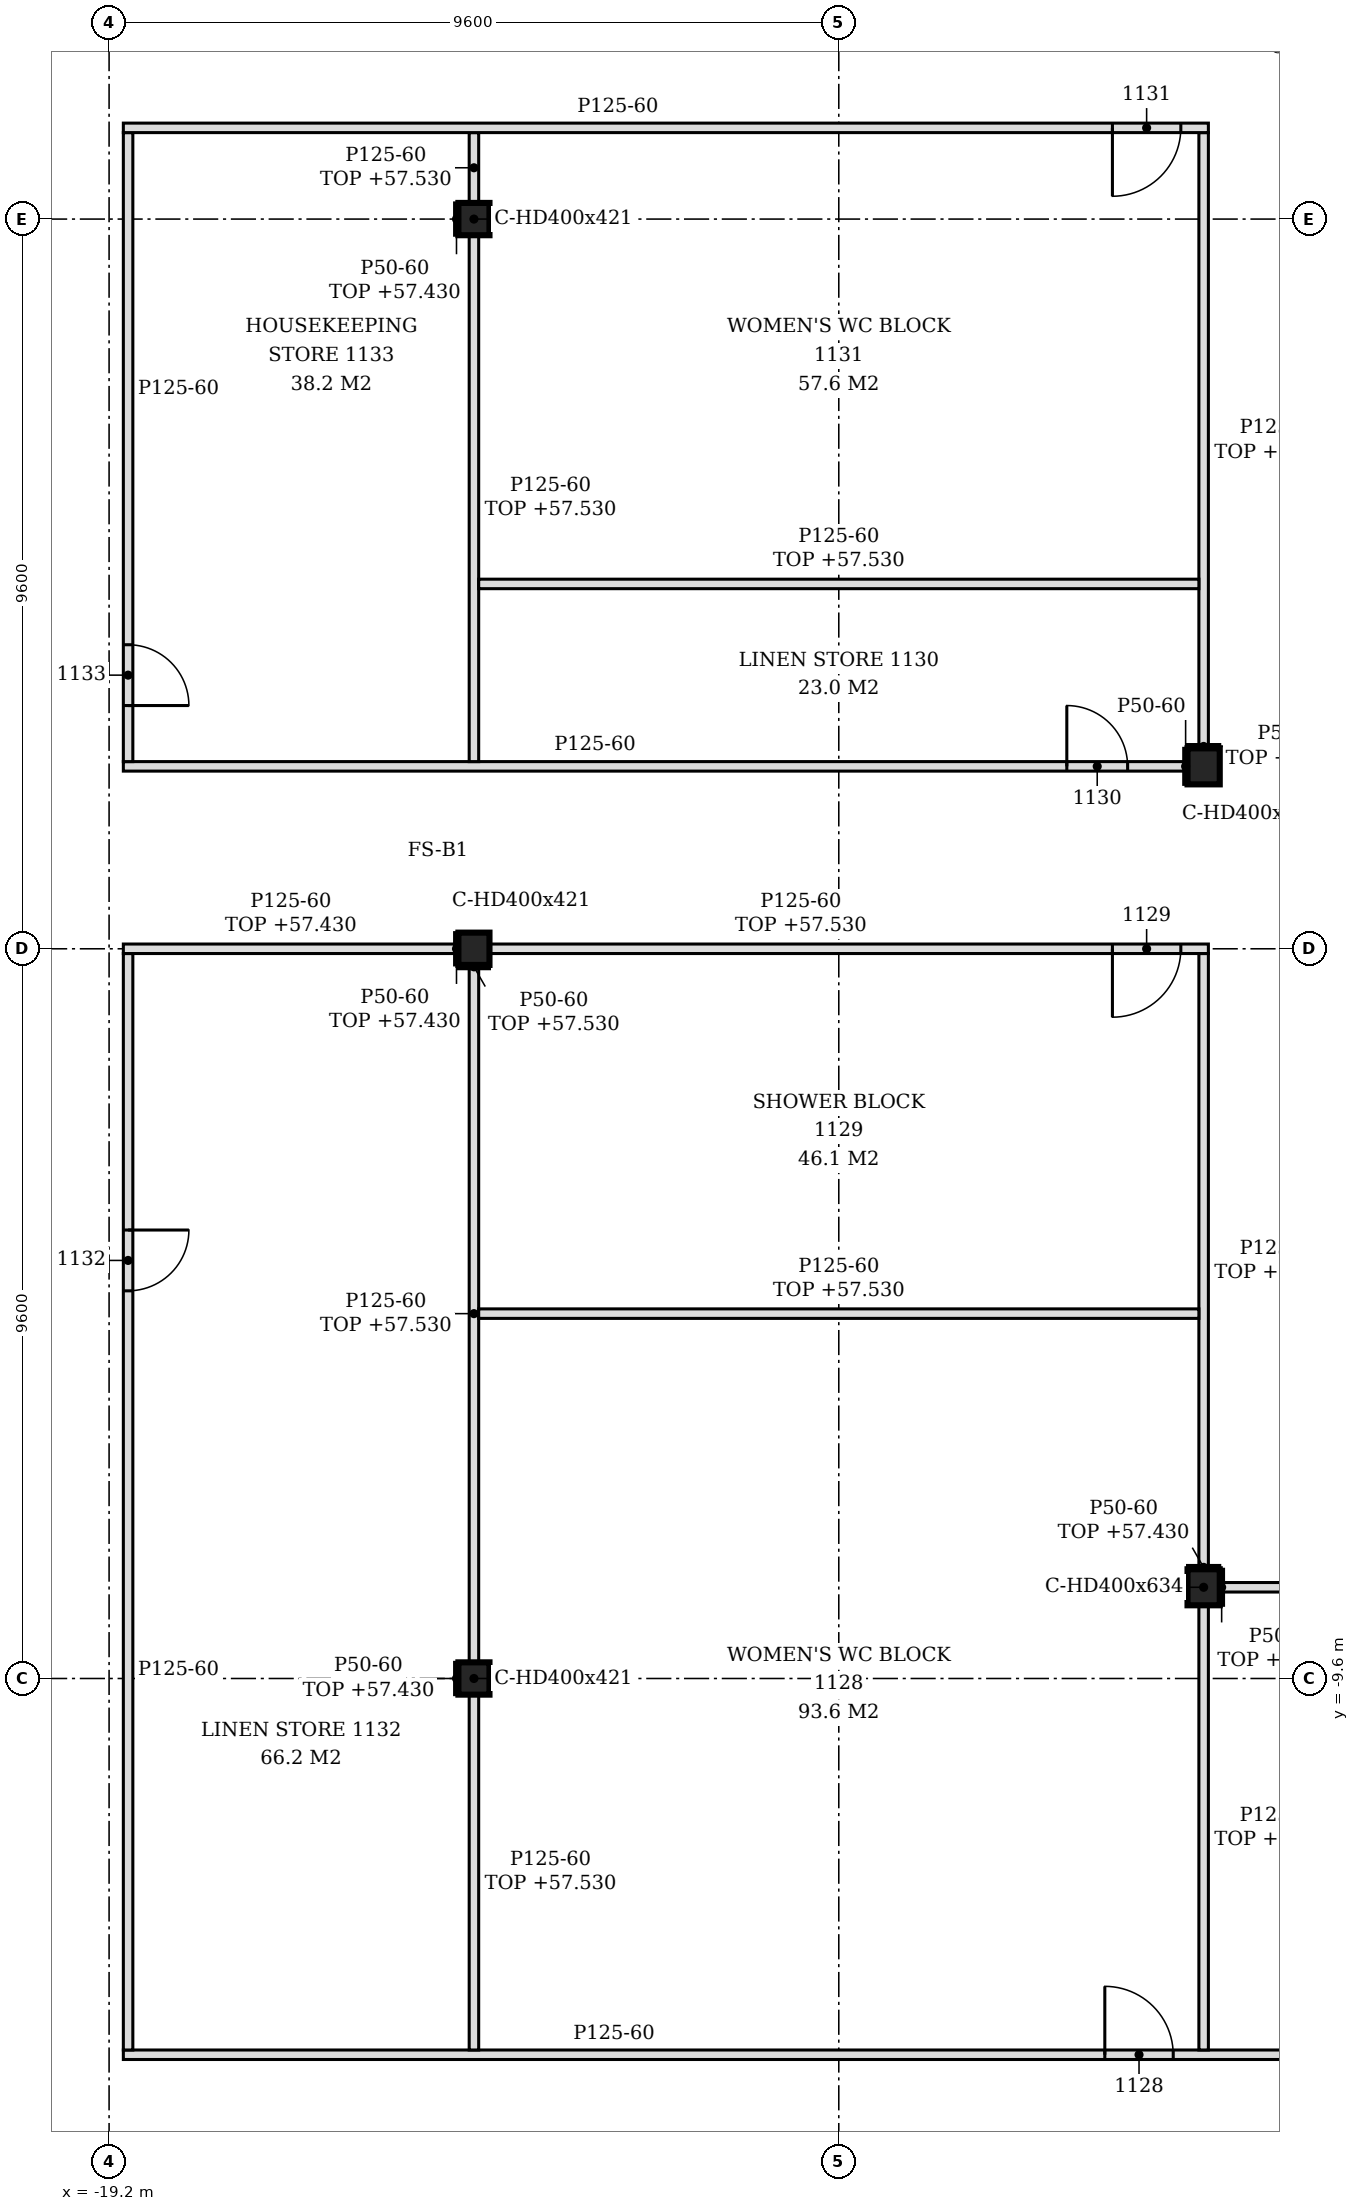
"""IFC4 building model, lengths in metres.
Left out: names, types, materials, properties, quantities, classifications, styles, units other than length and angle.
Written with IfcOpenShell. Run it as: python <this file> out.ifc"""

import sys

from ifc_helpers import new_model, si_unit, direction, frame, frame_2d, origin, origin_2d, place, context, subcontext, project, spatial, polyline, rectangle, i_section, outline, extrude, element, fill, save


model = new_model("IFC4")
c1 = context("Model", 3, precision=1e-05, world=origin(), true_north=direction((0.0, 1.0)))
c2 = subcontext(c1, "Body", "Model", "MODEL_VIEW")
j1 = project(units=[si_unit("LENGTHUNIT", "METRE"), si_unit("PLANEANGLEUNIT", "RADIAN")], contexts=[c1])
p1 = place(None, origin())
s1 = spatial("IfcSite", under=j1, at=p1, CompositionType="ELEMENT")
p2 = place(p1, origin())
s2 = spatial("IfcBuilding", under=s1, at=p2, CompositionType="ELEMENT")
p3 = place(p2, frame((0.0, 0.0, 54.6)))
s3 = spatial("IfcBuildingStorey", under=s2, at=p3, CompositionType="ELEMENT", Elevation=54.6)
for number, where, z_axis, x_axis in (
    (1, (-4.8, -8.4, -0.15), (0.0, 0.0, 1.0), (1.0, 0.0, 0.0)),
    (2, (-4.8, 2.4, -0.15), (0.0, 0.0, 1.0), (1.0, 0.0, 0.0)),
):
    element("IfcColumn", number, at=place(p3, frame(where, z_axis=z_axis, x_axis=x_axis)), inside=s3, PredefinedType="COLUMN", context=c2, shape_type="SweptSolid", body=[
        extrude(i_section(OverallWidth=0.424, OverallDepth=0.474, WebThickness=0.048, FlangeThickness=0.077, FilletRadius=0.015, at=origin_2d()), origin(), (0.0, 0.0, 1.0), 3.6),
    ])
for number, where, z_axis, x_axis in (
    (3, (-14.4, -9.6, -0.15), (0.0, 0.0, 1.0), (1.0, 0.0, 0.0)),
    (4, (-14.4, 0.0, -0.15), (0.0, 0.0, 1.0), (1.0, 0.0, 0.0)),
    (5, (-14.4, 9.6, -0.15), (0.0, 0.0, 1.0), (1.0, 0.0, 0.0)),
):
    element("IfcColumn", number, at=place(p3, frame(where, z_axis=z_axis, x_axis=x_axis)), inside=s3, PredefinedType="COLUMN", context=c2, shape_type="SweptSolid", body=[
        extrude(i_section(OverallWidth=0.409, OverallDepth=0.425, WebThickness=0.033, FlangeThickness=0.052, FilletRadius=0.015, at=origin_2d()), origin(), (0.0, 0.0, 1.0), 3.6),
    ])
p4 = place(p3, frame((-19.012, -14.55, 0.0), z_axis=(0.0, 0.0, 1.0), x_axis=(1.0, 0.0, 0.0)))
e6 = element("IfcWall", 6, at=p4, inside=s3, PredefinedType="PARTITIONING", context=c2, shape_type="SweptSolid", body=[
    extrude(outline(polyline([(0.0, 0.0), (19.075, 0.0), (19.075, 3.45), (14.363, 3.45), (14.361, 2.73), (14.062, 2.73), (14.061, 3.45), (4.762, 3.45), (4.76, 2.93), (4.462, 2.93), (4.46, 2.83), (0.0, 2.83), (0.0, 0.0)])), frame((0.0, 0.062, 0.0), z_axis=(0.0, -1.0, 0.0), x_axis=(1.0, 0.0, 0.0)), (0.0, 0.0, 1.0), 0.125),
])
p5 = place(p4, frame((12.913, 0.0, 0.0)))
e7 = element("IfcOpeningElement", 7, at=p5, cuts=e6, PredefinedType="OPENING", context=c2, shape_type="SweptSolid", body=[
    extrude(rectangle(XDim=0.9, YDim=2.1, at=frame_2d((0.45, 1.05))), frame((0.0, 0.073, 0.0), z_axis=(0.0, -1.0, 0.0), x_axis=(1.0, 0.0, 0.0)), (0.0, 0.0, 1.0), 0.145),
])
p6 = place(p3, frame((-18.95, -14.488, 0.0), z_axis=(0.0, 0.0, 1.0), x_axis=(0.0, 1.0, 0.0)))
e8 = element("IfcWall", 8, at=p6, inside=s3, PredefinedType="PARTITIONING", context=c2, shape_type="SweptSolid", body=[
    extrude(outline(polyline([(0.0, 0.0), (14.425, 0.0), (14.425, 2.83), (14.377, 2.83), (14.375, 3.45), (9.798, 3.45), (9.795, 2.83), (9.577, 2.83), (9.575, 3.45), (4.998, 3.45), (4.996, 2.83), (4.778, 2.83), (4.775, 3.45), (0.198, 3.45), (0.196, 2.83), (0.0, 2.83), (0.0, 0.0)])), frame((0.0, 0.062, 0.0), z_axis=(0.0, -1.0, 0.0), x_axis=(1.0, 0.0, 0.0)), (0.0, 0.0, 1.0), 0.125),
])
p7 = place(p6, frame((9.988, 0.0, 0.0)))
e9 = element("IfcOpeningElement", 9, at=p7, cuts=e8, PredefinedType="OPENING", context=c2, shape_type="SweptSolid", body=[
    extrude(rectangle(XDim=0.8, YDim=2.1, at=frame_2d((0.4, 1.05))), frame((0.0, 0.073, 0.0), z_axis=(0.0, -1.0, 0.0), x_axis=(1.0, 0.0, 0.0)), (0.0, 0.0, 1.0), 0.145),
])
p8 = place(p3, frame((-14.4, -14.488, 0.0), z_axis=(0.0, 0.0, 1.0), x_axis=(0.0, 1.0, 0.0)))
e10 = element("IfcWall", 10, at=p8, inside=s3, PredefinedType="PARTITIONING", context=c2, shape_type="SweptSolid", body=[
    extrude(rectangle(XDim=4.675, YDim=0.125, at=frame_2d((2.337, 0.0))), origin(), (0.0, 0.0, 1.0), 2.93),
])
p9 = place(p3, frame((-4.8, -14.488, 0.0), z_axis=(0.0, 0.0, 1.0), x_axis=(0.0, 1.0, 0.0)))
e11 = element("IfcWall", 11, at=p9, inside=s3, PredefinedType="PARTITIONING", context=c2, shape_type="SweptSolid", body=[
    extrude(rectangle(XDim=5.851, YDim=0.125, at=frame_2d((2.925, 0.0))), origin(), (0.0, 0.0, 1.0), 2.73),
])
p10 = place(p3, frame((-14.4, -9.387, 0.0), z_axis=(0.0, 0.0, 1.0), x_axis=(0.0, 1.0, 0.0)))
e12 = element("IfcWall", 12, at=p10, inside=s3, PredefinedType="PARTITIONING", context=c2, shape_type="SweptSolid", body=[
    extrude(rectangle(XDim=9.175, YDim=0.125, at=frame_2d((4.587, 0.0))), origin(), (0.0, 0.0, 1.0), 2.93),
])
p11 = place(p3, frame((-4.588, -8.4, 0.0), z_axis=(0.0, 0.0, 1.0), x_axis=(1.0, 0.0, 0.0)))
e13 = element("IfcWall", 13, at=p11, inside=s3, PredefinedType="PARTITIONING", context=c2, shape_type="SweptSolid", body=[
    extrude(rectangle(XDim=4.65, YDim=0.125, at=frame_2d((2.325, 0.0))), origin(), (0.0, 0.0, 1.0), 2.83),
])
p12 = place(p3, frame((-4.8, -8.163, 0.0), z_axis=(0.0, 0.0, 1.0), x_axis=(0.0, 1.0, 0.0)))
e14 = element("IfcWall", 14, at=p12, inside=s3, PredefinedType="PARTITIONING", context=c2, shape_type="SweptSolid", body=[
    extrude(rectangle(XDim=8.101, YDim=0.125, at=frame_2d((4.05, 0.0))), origin(), (0.0, 0.0, 1.0), 2.83),
])
p13 = place(p3, frame((-14.337, -4.8, 0.0), z_axis=(0.0, 0.0, 1.0), x_axis=(1.0, 0.0, 0.0)))
e15 = element("IfcWall", 15, at=p13, inside=s3, PredefinedType="PARTITIONING", context=c2, shape_type="SweptSolid", body=[
    extrude(outline(polyline([(0.0, 0.0), (9.475, 0.0), (9.475, 2.83), (9.387, 2.83), (9.385, 2.93), (0.0, 2.93), (0.0, 0.0)])), frame((0.0, 0.062, 0.0), z_axis=(0.0, -1.0, 0.0), x_axis=(1.0, 0.0, 0.0)), (0.0, 0.0, 1.0), 0.125),
])
p14 = place(p3, frame((-19.012, 0.0, 0.0), z_axis=(0.0, 0.0, 1.0), x_axis=(1.0, 0.0, 0.0)))
e16 = element("IfcWall", 16, at=p14, inside=s3, PredefinedType="PARTITIONING", context=c2, shape_type="SweptSolid", body=[
    extrude(rectangle(XDim=4.408, YDim=0.125, at=frame_2d((2.204, 0.0))), origin(), (0.0, 0.0, 1.0), 2.83),
])
p15 = place(p3, frame((-14.196, 0.0, 0.0), z_axis=(0.0, 0.0, 1.0), x_axis=(1.0, 0.0, 0.0)))
e17 = element("IfcWall", 17, at=p15, inside=s3, PredefinedType="PARTITIONING", context=c2, shape_type="SweptSolid", body=[
    extrude(outline(polyline([(0.0, 0.0), (9.458, 0.0), (9.458, 2.83), (9.246, 2.83), (9.243, 2.93), (0.0, 2.93), (0.0, 0.0)])), frame((0.0, 0.062, 0.0), z_axis=(0.0, -1.0, 0.0), x_axis=(1.0, 0.0, 0.0)), (0.0, 0.0, 1.0), 0.125),
])
p16 = place(p15, frame((8.196, 0.0, 0.0)))
e18 = element("IfcOpeningElement", 18, at=p16, cuts=e17, PredefinedType="OPENING", context=c2, shape_type="SweptSolid", body=[
    extrude(rectangle(XDim=0.9, YDim=2.1, at=frame_2d((0.45, 1.05))), frame((0.0, 0.073, 0.0), z_axis=(0.0, -1.0, 0.0), x_axis=(1.0, 0.0, 0.0)), (0.0, 0.0, 1.0), 0.145),
])
p17 = place(p3, frame((-19.012, 2.4, 0.0), z_axis=(0.0, 0.0, 1.0), x_axis=(1.0, 0.0, 0.0)))
e19 = element("IfcWall", 19, at=p17, inside=s3, PredefinedType="PARTITIONING", context=c2, shape_type="SweptSolid", body=[
    extrude(outline(polyline([(0.0, 0.0), (14.0, 0.0), (14.0, 3.45), (4.762, 3.45), (4.76, 2.93), (4.462, 2.93), (4.46, 3.45), (0.0, 3.45), (0.0, 0.0)])), frame((0.0, 0.062, 0.0), z_axis=(0.0, -1.0, 0.0), x_axis=(1.0, 0.0, 0.0)), (0.0, 0.0, 1.0), 0.125),
])
p18 = place(p17, frame((12.413, 0.0, 0.0)))
e20 = element("IfcOpeningElement", 20, at=p18, cuts=e19, PredefinedType="OPENING", context=c2, shape_type="SweptSolid", body=[
    extrude(rectangle(XDim=0.8, YDim=2.1, at=frame_2d((0.4, 1.05))), frame((0.0, 0.073, 0.0), z_axis=(0.0, -1.0, 0.0), x_axis=(1.0, 0.0, 0.0)), (0.0, 0.0, 1.0), 0.145),
])
p19 = place(p3, frame((-18.95, 2.462, 0.0), z_axis=(0.0, 0.0, 1.0), x_axis=(0.0, 1.0, 0.0)))
e21 = element("IfcWall", 21, at=p19, inside=s3, PredefinedType="PARTITIONING", context=c2, shape_type="SweptSolid", body=[
    extrude(outline(polyline([(0.0, 0.0), (8.275, 0.0), (8.275, 3.45), (7.248, 3.45), (7.246, 2.83), (7.028, 2.83), (7.025, 3.45), (2.448, 3.45), (2.446, 2.83), (2.228, 2.83), (2.226, 3.45), (0.0, 3.45), (0.0, 0.0)])), frame((0.0, 0.062, 0.0), z_axis=(0.0, -1.0, 0.0), x_axis=(1.0, 0.0, 0.0)), (0.0, 0.0, 1.0), 0.125),
])
p20 = place(p19, frame((0.738, 0.0, 0.0)))
e22 = element("IfcOpeningElement", 22, at=p20, cuts=e21, PredefinedType="OPENING", context=c2, shape_type="SweptSolid", body=[
    extrude(rectangle(XDim=0.8, YDim=2.1, at=frame_2d((0.4, 1.05))), frame((0.0, 0.073, 0.0), z_axis=(0.0, -1.0, 0.0), x_axis=(1.0, 0.0, 0.0)), (0.0, 0.0, 1.0), 0.145),
])
p21 = place(p3, frame((-14.4, 2.462, 0.0), z_axis=(0.0, 0.0, 1.0), x_axis=(0.0, 1.0, 0.0)))
e23 = element("IfcWall", 23, at=p21, inside=s3, PredefinedType="PARTITIONING", context=c2, shape_type="SweptSolid", body=[
    extrude(rectangle(XDim=6.925, YDim=0.125, at=frame_2d((3.462, 0.0))), origin(), (0.0, 0.0, 1.0), 2.93),
])
p22 = place(p3, frame((-4.8, 2.637, 0.0), z_axis=(0.0, 0.0, 1.0), x_axis=(0.0, 1.0, 0.0)))
e24 = element("IfcWall", 24, at=p22, inside=s3, PredefinedType="PARTITIONING", context=c2, shape_type="SweptSolid", body=[
    extrude(rectangle(XDim=8.101, YDim=0.125, at=frame_2d((4.05, 0.0))), origin(), (0.0, 0.0, 1.0), 2.83),
])
p23 = place(p3, frame((-14.337, 4.8, 0.0), z_axis=(0.0, 0.0, 1.0), x_axis=(1.0, 0.0, 0.0)))
e25 = element("IfcWall", 25, at=p23, inside=s3, PredefinedType="PARTITIONING", context=c2, shape_type="SweptSolid", body=[
    extrude(outline(polyline([(0.0, 0.0), (9.475, 0.0), (9.475, 2.83), (9.387, 2.83), (9.385, 2.93), (0.0, 2.93), (0.0, 0.0)])), frame((0.0, 0.062, 0.0), z_axis=(0.0, -1.0, 0.0), x_axis=(1.0, 0.0, 0.0)), (0.0, 0.0, 1.0), 0.125),
])
p24 = place(p3, frame((-14.4, 9.812, 0.0), z_axis=(0.0, 0.0, 1.0), x_axis=(0.0, 1.0, 0.0)))
e26 = element("IfcWall", 26, at=p24, inside=s3, PredefinedType="PARTITIONING", context=c2, shape_type="SweptSolid", body=[
    extrude(rectangle(XDim=0.925, YDim=0.125, at=frame_2d((0.462, 0.0))), origin(), (0.0, 0.0, 1.0), 2.93),
])
p25 = place(p3, frame((-19.012, 10.8, 0.0), z_axis=(0.0, 0.0, 1.0), x_axis=(1.0, 0.0, 0.0)))
e27 = element("IfcWall", 27, at=p25, inside=s3, PredefinedType="PARTITIONING", context=c2, shape_type="SweptSolid", body=[
    extrude(outline(polyline([(0.0, 0.0), (14.275, 0.0), (14.275, 2.83), (14.062, 2.83), (14.061, 3.45), (4.762, 3.45), (4.76, 2.93), (4.462, 2.93), (4.46, 3.45), (0.0, 3.45), (0.0, 0.0)])), frame((0.0, 0.062, 0.0), z_axis=(0.0, -1.0, 0.0), x_axis=(1.0, 0.0, 0.0)), (0.0, 0.0, 1.0), 0.125),
])
p26 = place(p25, frame((13.012, 0.0, 0.0)))
e28 = element("IfcOpeningElement", 28, at=p26, cuts=e27, PredefinedType="OPENING", context=c2, shape_type="SweptSolid", body=[
    extrude(rectangle(XDim=0.9, YDim=2.1, at=frame_2d((0.45, 1.05))), frame((0.0, 0.073, 0.0), z_axis=(0.0, -1.0, 0.0), x_axis=(1.0, 0.0, 0.0)), (0.0, 0.0, 1.0), 0.145),
])
p27 = place(p3, frame((-14.629, -9.812, 0.0), z_axis=(0.0, 0.0, 1.0), x_axis=(0.0, 1.0, 0.0)))
e29 = element("IfcWall", 29, at=p27, inside=s3, PredefinedType="PARTITIONING", context=c2, shape_type="SweptSolid", body=[
    extrude(rectangle(XDim=0.425, YDim=0.05, at=frame_2d((0.212, 0.0))), origin(), (0.0, 0.0, 1.0), 2.83),
])
p28 = place(p3, frame((-14.629, -0.212, 0.0), z_axis=(0.0, 0.0, 1.0), x_axis=(0.0, 1.0, 0.0)))
e30 = element("IfcWall", 30, at=p28, inside=s3, PredefinedType="PARTITIONING", context=c2, shape_type="SweptSolid", body=[
    extrude(rectangle(XDim=0.425, YDim=0.05, at=frame_2d((0.212, 0.0))), origin(), (0.0, 0.0, 1.0), 2.83),
])
p29 = place(p3, frame((-4.563, -8.637, 0.0), z_axis=(0.0, 0.0, 1.0), x_axis=(0.0, 1.0, 0.0)))
e31 = element("IfcWall", 31, at=p29, inside=s3, PredefinedType="PARTITIONING", context=c2, shape_type="SweptSolid", body=[
    extrude(rectangle(XDim=0.474, YDim=0.05, at=frame_2d((0.237, 0.0))), origin(), (0.0, 0.0, 1.0), 2.83),
])
p30 = place(p3, frame((-5.012, -8.138, 0.0), z_axis=(0.0, 0.0, 1.0), x_axis=(1.0, 0.0, 0.0)))
e32 = element("IfcWall", 32, at=p30, inside=s3, PredefinedType="PARTITIONING", context=c2, shape_type="SweptSolid", body=[
    extrude(rectangle(XDim=0.424, YDim=0.05, at=frame_2d((0.212, 0.0))), origin(), (0.0, 0.0, 1.0), 2.83),
])
p31 = place(p3, frame((-14.604, -0.238, 0.0), z_axis=(0.0, 0.0, 1.0), x_axis=(1.0, 0.0, 0.0)))
e33 = element("IfcWall", 33, at=p31, inside=s3, PredefinedType="PARTITIONING", context=c2, shape_type="SweptSolid", body=[
    extrude(rectangle(XDim=0.409, YDim=0.05, at=frame_2d((0.205, 0.0))), origin(), (0.0, 0.0, 1.0), 2.93),
])
p32 = place(p3, frame((-5.012, 2.662, 0.0), z_axis=(0.0, 0.0, 1.0), x_axis=(1.0, 0.0, 0.0)))
e34 = element("IfcWall", 34, at=p32, inside=s3, PredefinedType="PARTITIONING", context=c2, shape_type="SweptSolid", body=[
    extrude(rectangle(XDim=0.424, YDim=0.05, at=frame_2d((0.212, 0.0))), origin(), (0.0, 0.0, 1.0), 2.83),
])
p33 = place(p3, frame((-14.629, 9.387, 0.0), z_axis=(0.0, 0.0, 1.0), x_axis=(0.0, 1.0, 0.0)))
e35 = element("IfcWall", 35, at=p33, inside=s3, PredefinedType="PARTITIONING", context=c2, shape_type="SweptSolid", body=[
    extrude(rectangle(XDim=0.425, YDim=0.05, at=frame_2d((0.212, 0.0))), origin(), (0.0, 0.0, 1.0), 2.83),
])
p34 = place(p3, frame((-5.037, 2.163, 0.0), z_axis=(0.0, 0.0, 1.0), x_axis=(0.0, 1.0, 0.0)))
e36 = element("IfcWall", 36, at=p34, inside=s3, PredefinedType="PARTITIONING", context=c2, shape_type="SweptSolid", body=[
    extrude(rectangle(XDim=0.474, YDim=0.05, at=frame_2d((0.237, 0.0))), origin(), (0.0, 0.0, 1.0), 3.45),
])
p35 = place(p5, origin())
e37 = element("IfcDoor", 37, at=p35, inside=s3, OperationType="SINGLE_SWING_LEFT", PredefinedType="DOOR", context=c2, shape_type="SweptSolid", body=[
    extrude(rectangle(XDim=0.9, YDim=2.1, at=frame_2d((0.45, 1.05))), frame((0.0, 0.025, 0.0), z_axis=(0.0, -1.0, 0.0), x_axis=(1.0, 0.0, 0.0)), (0.0, 0.0, 1.0), 0.05),
])
fill(e7, e37)
p36 = place(p16, frame((0.9, 0.0, 0.0), z_axis=(0.0, 0.0, 1.0), x_axis=(-1.0, 0.0, 0.0)))
e38 = element("IfcDoor", 38, at=p36, inside=s3, OperationType="SINGLE_SWING_RIGHT", PredefinedType="DOOR", context=c2, shape_type="SweptSolid", body=[
    extrude(rectangle(XDim=0.9, YDim=2.1, at=frame_2d((0.45, 1.05))), frame((0.0, 0.025, 0.0), z_axis=(0.0, -1.0, 0.0), x_axis=(1.0, 0.0, 0.0)), (0.0, 0.0, 1.0), 0.05),
])
fill(e18, e38)
p37 = place(p18, origin())
e39 = element("IfcDoor", 39, at=p37, inside=s3, OperationType="SINGLE_SWING_LEFT", PredefinedType="DOOR", context=c2, shape_type="SweptSolid", body=[
    extrude(rectangle(XDim=0.8, YDim=2.1, at=frame_2d((0.4, 1.05))), frame((0.0, 0.025, 0.0), z_axis=(0.0, -1.0, 0.0), x_axis=(1.0, 0.0, 0.0)), (0.0, 0.0, 1.0), 0.05),
])
fill(e20, e39)
p38 = place(p26, frame((0.9, 0.0, 0.0), z_axis=(0.0, 0.0, 1.0), x_axis=(-1.0, 0.0, 0.0)))
e40 = element("IfcDoor", 40, at=p38, inside=s3, OperationType="SINGLE_SWING_RIGHT", PredefinedType="DOOR", context=c2, shape_type="SweptSolid", body=[
    extrude(rectangle(XDim=0.9, YDim=2.1, at=frame_2d((0.45, 1.05))), frame((0.0, 0.025, 0.0), z_axis=(0.0, -1.0, 0.0), x_axis=(1.0, 0.0, 0.0)), (0.0, 0.0, 1.0), 0.05),
])
fill(e28, e40)
p39 = place(p7, frame((0.8, 0.0, 0.0), z_axis=(0.0, 0.0, 1.0), x_axis=(-1.0, 0.0, 0.0)))
e41 = element("IfcDoor", 41, at=p39, inside=s3, OperationType="SINGLE_SWING_LEFT", PredefinedType="DOOR", context=c2, shape_type="SweptSolid", body=[
    extrude(rectangle(XDim=0.8, YDim=2.1, at=frame_2d((0.4, 1.05))), frame((0.0, 0.025, 0.0), z_axis=(0.0, -1.0, 0.0), x_axis=(1.0, 0.0, 0.0)), (0.0, 0.0, 1.0), 0.05),
])
fill(e9, e41)
p40 = place(p20, frame((0.8, 0.0, 0.0), z_axis=(0.0, 0.0, 1.0), x_axis=(-1.0, 0.0, 0.0)))
e42 = element("IfcDoor", 42, at=p40, inside=s3, OperationType="SINGLE_SWING_RIGHT", PredefinedType="DOOR", context=c2, shape_type="SweptSolid", body=[
    extrude(rectangle(XDim=0.8, YDim=2.1, at=frame_2d((0.4, 1.05))), frame((0.0, 0.025, 0.0), z_axis=(0.0, -1.0, 0.0), x_axis=(1.0, 0.0, 0.0)), (0.0, 0.0, 1.0), 0.05),
])
fill(e22, e42)
save(model, sys.argv[1])
